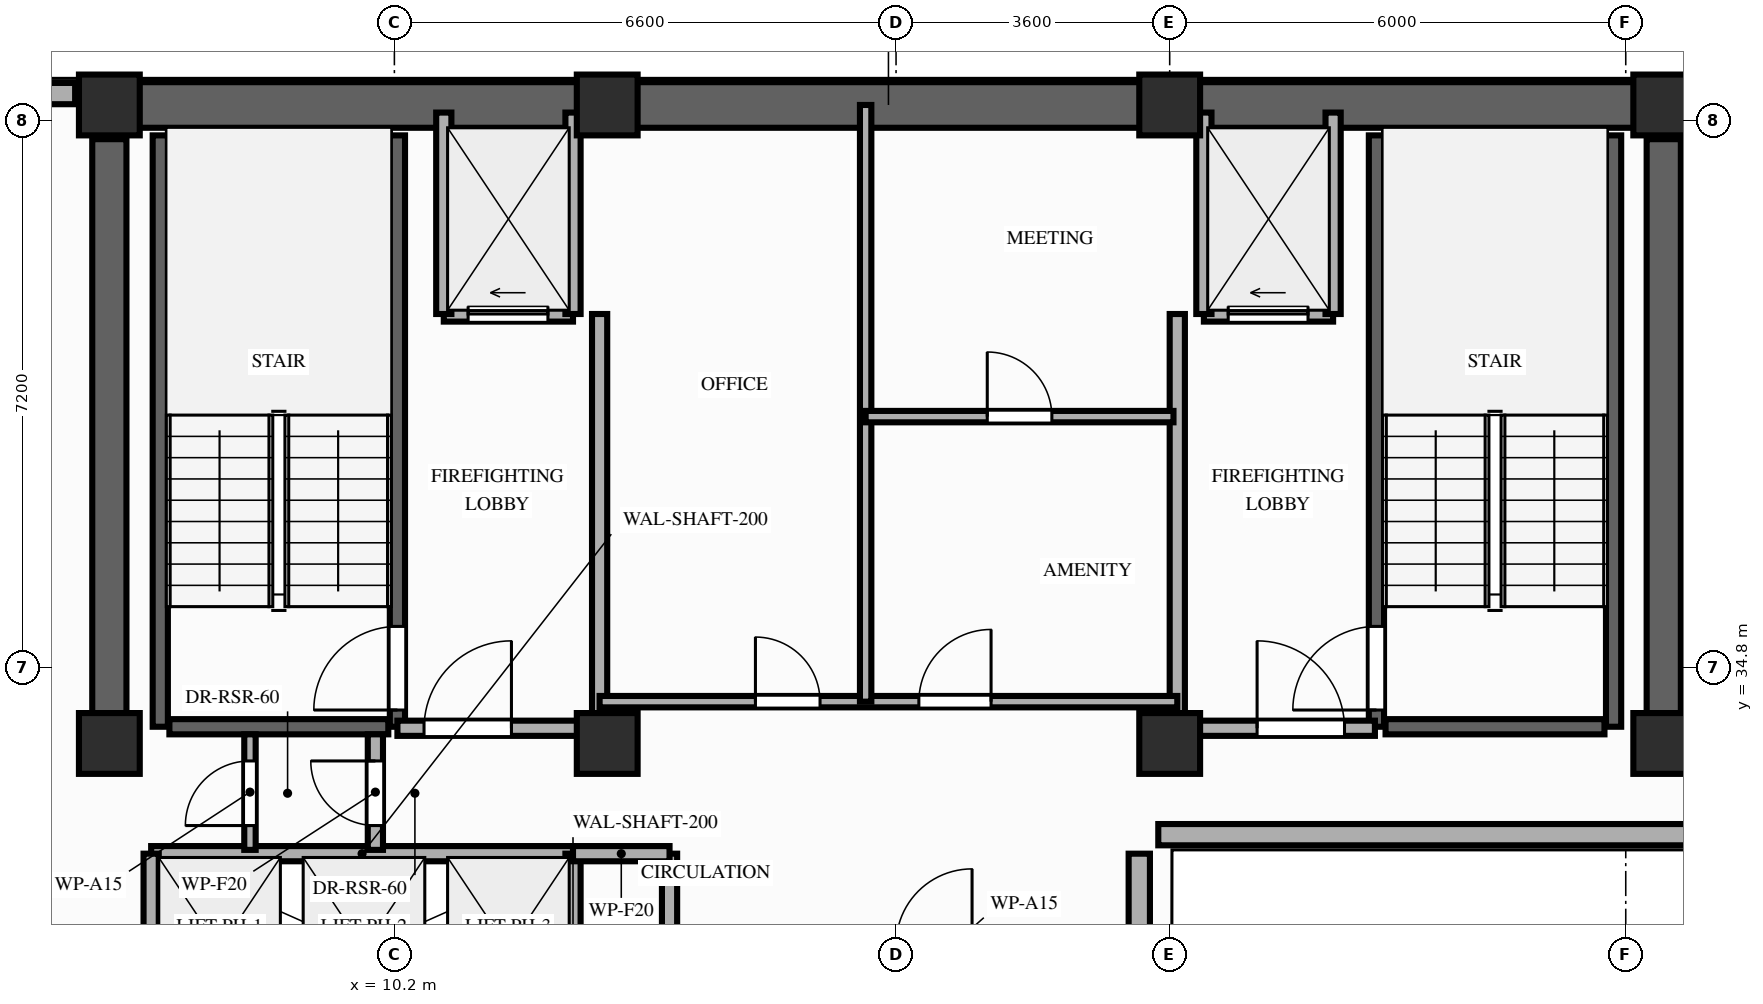
"""IFC4 building model, lengths in metres.
Left out: names, types, materials, properties, quantities, classifications, styles, units other than length and angle.
Written with IfcOpenShell. Run it as: python <this file> out.ifc"""

import sys

from ifc_helpers import new_model, si_unit, direction, frame, frame_2d, origin, origin_2d, place, context, subcontext, project, spatial, rectangle, extrude, element, fill, save


model = new_model("IFC4")
c1 = context("Model", 3, precision=1e-05, world=origin(), true_north=direction((0.0, 1.0)))
c2 = subcontext(c1, "Body", "Model", "MODEL_VIEW")
j1 = project(units=[si_unit("LENGTHUNIT", "METRE"), si_unit("PLANEANGLEUNIT", "RADIAN")], contexts=[c1])
p1 = place(None, origin())
s1 = spatial("IfcSite", under=j1, at=p1, CompositionType="ELEMENT")
p2 = place(p1, origin())
s2 = spatial("IfcBuilding", under=s1, at=p2, CompositionType="ELEMENT")
p3 = place(p2, frame((0.0, 0.0, 221.6)))
s3 = spatial("IfcBuildingStorey", under=s2, at=p3, CompositionType="ELEMENT", Elevation=221.6)
for number, where, z_axis, x_axis in (
    (1, (6.45, 33.8, 0.0), (0.0, 0.0, 1.0), (1.0, 0.0, 0.0)),
    (2, (13.0, 33.8, 0.0), (0.0, 0.0, 1.0), (1.0, 0.0, 0.0)),
    (3, (20.4, 33.8, 0.0), (0.0, 0.0, 1.0), (1.0, 0.0, 0.0)),
    (4, (26.9, 33.8, 0.0), (0.0, 0.0, 1.0), (1.0, 0.0, 0.0)),
    (5, (6.45, 42.2, 0.0), (0.0, 0.0, 1.0), (1.0, 0.0, 0.0)),
    (6, (13.0, 42.2, 0.0), (0.0, 0.0, 1.0), (1.0, 0.0, 0.0)),
    (7, (20.4, 42.2, 0.0), (0.0, 0.0, 1.0), (1.0, 0.0, 0.0)),
    (8, (26.9, 42.2, 0.0), (0.0, 0.0, 1.0), (1.0, 0.0, 0.0)),
):
    element("IfcColumn", number, at=place(p3, frame(where, z_axis=z_axis, x_axis=x_axis)), inside=s3, PredefinedType="COLUMN", context=c2, shape_type="SweptSolid", body=[
        extrude(rectangle(XDim=0.8, YDim=0.8, at=origin_2d()), origin(), (0.0, 0.0, 1.0), 3.2),
    ])
p4 = place(p3, frame((20.0, 8.8, 0.0), z_axis=(0.0, 0.0, 1.0), x_axis=(0.0, 1.0, 0.0)))
e9 = element("IfcWall", 9, at=p4, inside=s3, PredefinedType="STANDARD", context=c2, shape_type="SweptSolid", body=[
    extrude(rectangle(XDim=23.55, YDim=0.28, at=frame_2d((11.775, 0.0))), origin(), (0.0, 0.0, 1.0), 2.51),
])
p5 = place(p4, frame((1.84, 0.0, 0.85)))
e10 = element("IfcOpeningElement", 10, at=p5, cuts=e9, PredefinedType="OPENING", context=c2, shape_type="SweptSolid", body=[
    extrude(rectangle(XDim=1.1, YDim=1.41, at=frame_2d((0.55, 0.705))), frame((0.0, 0.15, 0.0), z_axis=(0.0, -1.0, 0.0), x_axis=(1.0, 0.0, 0.0)), (0.0, 0.0, 1.0), 0.3),
])
p6 = place(p4, frame((5.45, 0.0, 0.85)))
e11 = element("IfcOpeningElement", 11, at=p6, cuts=e9, PredefinedType="OPENING", context=c2, shape_type="SweptSolid", body=[
    extrude(rectangle(XDim=2.1, YDim=1.41, at=frame_2d((1.05, 0.705))), frame((0.0, 0.15, 0.0), z_axis=(0.0, -1.0, 0.0), x_axis=(1.0, 0.0, 0.0)), (0.0, 0.0, 1.0), 0.3),
])
p7 = place(p4, frame((10.85, 0.0, 0.85)))
e12 = element("IfcOpeningElement", 12, at=p7, cuts=e9, PredefinedType="OPENING", context=c2, shape_type="SweptSolid", body=[
    extrude(rectangle(XDim=2.1, YDim=1.41, at=frame_2d((1.05, 0.705))), frame((0.0, 0.15, 0.0), z_axis=(0.0, -1.0, 0.0), x_axis=(1.0, 0.0, 0.0)), (0.0, 0.0, 1.0), 0.3),
])
p8 = place(p3, frame((6.0, 42.35, 0.0), z_axis=(0.0, 0.0, 1.0), x_axis=(-1.0, 0.0, 0.0)))
e13 = element("IfcWall", 13, at=p8, inside=s3, PredefinedType="STANDARD", context=c2, shape_type="SweptSolid", body=[
    extrude(rectangle(XDim=2.0, YDim=0.28, at=frame_2d((1.0, 0.0))), origin(), (0.0, 0.0, 1.0), 3.02),
])
p9 = place(p3, frame((20.25, 32.6, 0.0), z_axis=(0.0, 0.0, 1.0), x_axis=(1.0, 0.0, 0.0)))
e14 = element("IfcWall", 14, at=p9, inside=s3, PredefinedType="STANDARD", context=c2, shape_type="SweptSolid", body=[
    extrude(rectangle(XDim=7.35, YDim=0.28, at=frame_2d((3.675, 0.0))), origin(), (0.0, 0.0, 1.0), 2.51),
])
p10 = place(p3, frame((6.45, 42.2, 0.0), z_axis=(0.0, 0.0, 1.0), x_axis=(1.0, 0.0, 0.0)))
e15 = element("IfcWall", 15, at=p10, inside=s3, PredefinedType="SHEAR", context=c2, shape_type="SweptSolid", body=[
    extrude(rectangle(XDim=20.45, YDim=0.6, at=frame_2d((10.225, 0.0))), origin(), (0.0, 0.0, 1.0), 3.02),
])
for number, where, z_axis, x_axis in (
    (16, (6.45, 33.8, 0.0), (0.0, 0.0, 1.0), (0.0, 1.0, 0.0)),
    (17, (26.9, 33.8, 0.0), (0.0, 0.0, 1.0), (0.0, 1.0, 0.0)),
):
    element("IfcWall", number, at=place(p3, frame(where, z_axis=z_axis, x_axis=x_axis)), inside=s3, PredefinedType="SHEAR", context=c2, shape_type="SweptSolid", body=[
        extrude(rectangle(XDim=7.95, YDim=0.45, at=frame_2d((3.975, 0.0))), origin(), (0.0, 0.0, 1.0), 3.02),
    ])
p11 = place(p3, frame((7.12, 34.02, 0.0), z_axis=(0.0, 0.0, 1.0), x_axis=(0.0, 1.0, 0.0)))
e18 = element("IfcWall", 18, at=p11, inside=s3, PredefinedType="SHEAR", context=c2, shape_type="SweptSolid", body=[
    extrude(rectangle(XDim=7.78, YDim=0.2, at=frame_2d((3.89, 0.0))), origin(), (0.0, 0.0, 1.0), 3.02),
])
p12 = place(p3, frame((10.24, 34.02, 0.0), z_axis=(0.0, 0.0, 1.0), x_axis=(0.0, 1.0, 0.0)))
e19 = element("IfcWall", 19, at=p12, inside=s3, PredefinedType="SHEAR", context=c2, shape_type="SweptSolid", body=[
    extrude(rectangle(XDim=7.78, YDim=0.2, at=frame_2d((3.89, 0.0))), origin(), (0.0, 0.0, 1.0), 3.02),
])
p13 = place(p12, frame((0.22, 0.0, 0.0)))
e20 = element("IfcOpeningElement", 20, at=p13, cuts=e19, PredefinedType="OPENING", context=c2, shape_type="SweptSolid", body=[
    extrude(rectangle(XDim=1.1, YDim=2.15, at=frame_2d((0.55, 1.075))), frame((0.0, 0.11, 0.0), z_axis=(0.0, -1.0, 0.0), x_axis=(1.0, 0.0, 0.0)), (0.0, 0.0, 1.0), 0.22),
])
p14 = place(p3, frame((7.24, 34.02, 0.0), z_axis=(0.0, 0.0, 1.0), x_axis=(1.0, 0.0, 0.0)))
e21 = element("IfcWall", 21, at=p14, inside=s3, PredefinedType="SHEAR", context=c2, shape_type="SweptSolid", body=[
    extrude(rectangle(XDim=2.88, YDim=0.2, at=frame_2d((1.44, 0.0))), origin(), (0.0, 0.0, 1.0), 3.02),
])
p15 = place(p3, frame((23.12, 34.02, 0.0), z_axis=(0.0, 0.0, 1.0), x_axis=(0.0, 1.0, 0.0)))
e22 = element("IfcWall", 22, at=p15, inside=s3, PredefinedType="SHEAR", context=c2, shape_type="SweptSolid", body=[
    extrude(rectangle(XDim=7.78, YDim=0.2, at=frame_2d((3.89, 0.0))), origin(), (0.0, 0.0, 1.0), 3.02),
])
p16 = place(p15, frame((0.22, 0.0, 0.0)))
e23 = element("IfcOpeningElement", 23, at=p16, cuts=e22, PredefinedType="OPENING", context=c2, shape_type="SweptSolid", body=[
    extrude(rectangle(XDim=1.1, YDim=2.15, at=frame_2d((0.55, 1.075))), frame((0.0, 0.11, 0.0), z_axis=(0.0, -1.0, 0.0), x_axis=(1.0, 0.0, 0.0)), (0.0, 0.0, 1.0), 0.22),
])
p17 = place(p3, frame((26.24, 34.02, 0.0), z_axis=(0.0, 0.0, 1.0), x_axis=(0.0, 1.0, 0.0)))
e24 = element("IfcWall", 24, at=p17, inside=s3, PredefinedType="SHEAR", context=c2, shape_type="SweptSolid", body=[
    extrude(rectangle(XDim=7.78, YDim=0.2, at=frame_2d((3.89, 0.0))), origin(), (0.0, 0.0, 1.0), 3.02),
])
p18 = place(p3, frame((23.24, 34.02, 0.0), z_axis=(0.0, 0.0, 1.0), x_axis=(1.0, 0.0, 0.0)))
e25 = element("IfcWall", 25, at=p18, inside=s3, PredefinedType="SHEAR", context=c2, shape_type="SweptSolid", body=[
    extrude(rectangle(XDim=2.88, YDim=0.2, at=frame_2d((1.44, 0.0))), origin(), (0.0, 0.0, 1.0), 3.02),
])
p19 = place(p3, frame((7.0, 32.35, 0.0), z_axis=(0.0, 0.0, 1.0), x_axis=(1.0, 0.0, 0.0)))
e26 = element("IfcWall", 26, at=p19, inside=s3, PredefinedType="MOVABLE", context=c2, shape_type="SweptSolid", body=[
    extrude(rectangle(XDim=5.55, YDim=0.2, at=frame_2d((2.775, 0.0))), origin(), (0.0, 0.0, 1.0), 3.02),
])
for number, where, z_axis, x_axis in (
    (27, (7.0, 29.85, 0.0), (0.0, 0.0, 1.0), (0.0, 1.0, 0.0)),
    (28, (12.55, 29.85, 0.0), (0.0, 0.0, 1.0), (0.0, 1.0, 0.0)),
):
    element("IfcWall", number, at=place(p3, frame(where, z_axis=z_axis, x_axis=x_axis)), inside=s3, PredefinedType="MOVABLE", context=c2, shape_type="SweptSolid", body=[
        extrude(rectangle(XDim=2.5, YDim=0.2, at=frame_2d((1.25, 0.0))), origin(), (0.0, 0.0, 1.0), 3.02),
    ])
p20 = place(p3, frame((10.85, 39.45, 0.0), z_axis=(0.0, 0.0, 1.0), x_axis=(1.0, 0.0, 0.0)))
e29 = element("IfcWall", 29, at=p20, inside=s3, PredefinedType="MOVABLE", context=c2, shape_type="SweptSolid", body=[
    extrude(rectangle(XDim=1.7, YDim=0.2, at=frame_2d((0.85, 0.0))), origin(), (0.0, 0.0, 1.0), 3.02),
])
p21 = place(p20, frame((0.32, 0.0, 0.0)))
e30 = element("IfcOpeningElement", 30, at=p21, cuts=e29, PredefinedType="OPENING", context=c2, shape_type="SweptSolid", body=[
    extrude(rectangle(XDim=1.05, YDim=2.15, at=frame_2d((0.525, 1.075))), frame((0.0, 0.11, 0.0), z_axis=(0.0, -1.0, 0.0), x_axis=(1.0, 0.0, 0.0)), (0.0, 0.0, 1.0), 0.22),
])
p22 = place(p3, frame((20.85, 39.45, 0.0), z_axis=(0.0, 0.0, 1.0), x_axis=(1.0, 0.0, 0.0)))
e31 = element("IfcWall", 31, at=p22, inside=s3, PredefinedType="MOVABLE", context=c2, shape_type="SweptSolid", body=[
    extrude(rectangle(XDim=1.7, YDim=0.2, at=frame_2d((0.85, 0.0))), origin(), (0.0, 0.0, 1.0), 3.02),
])
p23 = place(p22, frame((0.32, 0.0, 0.0)))
e32 = element("IfcOpeningElement", 32, at=p23, cuts=e31, PredefinedType="OPENING", context=c2, shape_type="SweptSolid", body=[
    extrude(rectangle(XDim=1.05, YDim=2.15, at=frame_2d((0.525, 1.075))), frame((0.0, 0.11, 0.0), z_axis=(0.0, -1.0, 0.0), x_axis=(1.0, 0.0, 0.0)), (0.0, 0.0, 1.0), 0.22),
])
for number, where, z_axis, x_axis in (
    (33, (10.85, 39.45, 0.0), (0.0, 0.0, 1.0), (0.0, 1.0, 0.0)),
    (34, (12.55, 39.45, 0.0), (0.0, 0.0, 1.0), (0.0, 1.0, 0.0)),
):
    element("IfcWall", number, at=place(p3, frame(where, z_axis=z_axis, x_axis=x_axis)), inside=s3, PredefinedType="MOVABLE", context=c2, shape_type="SweptSolid", body=[
        extrude(rectangle(XDim=2.65, YDim=0.2, at=frame_2d((1.325, 0.0))), origin(), (0.0, 0.0, 1.0), 2.51),
    ])
p24 = place(p3, frame((12.9, 34.0, 0.0), z_axis=(0.0, 0.0, 1.0), x_axis=(0.0, 1.0, 0.0)))
e35 = element("IfcWall", 35, at=p24, inside=s3, PredefinedType="PARTITIONING", context=c2, shape_type="SweptSolid", body=[
    extrude(rectangle(XDim=5.45, YDim=0.2, at=frame_2d((2.725, 0.0))), origin(), (0.0, 0.0, 1.0), 2.51),
])
p25 = place(p3, frame((10.24, 34.0, 0.0), z_axis=(0.0, 0.0, 1.0), x_axis=(1.0, 0.0, 0.0)))
e36 = element("IfcWall", 36, at=p25, inside=s3, PredefinedType="PARTITIONING", context=c2, shape_type="SweptSolid", body=[
    extrude(rectangle(XDim=2.66, YDim=0.2, at=frame_2d((1.33, 0.0))), origin(), (0.0, 0.0, 1.0), 2.51),
])
p26 = place(p25, frame((0.35, 0.0, 0.0)))
e37 = element("IfcOpeningElement", 37, at=p26, cuts=e36, PredefinedType="OPENING", context=c2, shape_type="SweptSolid", body=[
    extrude(rectangle(XDim=1.15, YDim=2.15, at=frame_2d((0.575, 1.075))), frame((0.0, 0.11, 0.0), z_axis=(0.0, -1.0, 0.0), x_axis=(1.0, 0.0, 0.0)), (0.0, 0.0, 1.0), 0.22),
])
for number, where, z_axis, x_axis in (
    (38, (20.85, 39.45, 0.0), (0.0, 0.0, 1.0), (0.0, 1.0, 0.0)),
    (39, (22.55, 39.45, 0.0), (0.0, 0.0, 1.0), (0.0, 1.0, 0.0)),
):
    element("IfcWall", number, at=place(p3, frame(where, z_axis=z_axis, x_axis=x_axis)), inside=s3, PredefinedType="MOVABLE", context=c2, shape_type="SweptSolid", body=[
        extrude(rectangle(XDim=2.65, YDim=0.2, at=frame_2d((1.325, 0.0))), origin(), (0.0, 0.0, 1.0), 2.51),
    ])
p27 = place(p3, frame((20.5, 34.0, 0.0), z_axis=(0.0, 0.0, 1.0), x_axis=(0.0, 1.0, 0.0)))
e40 = element("IfcWall", 40, at=p27, inside=s3, PredefinedType="PARTITIONING", context=c2, shape_type="SweptSolid", body=[
    extrude(rectangle(XDim=5.45, YDim=0.2, at=frame_2d((2.725, 0.0))), origin(), (0.0, 0.0, 1.0), 2.51),
])
p28 = place(p3, frame((20.5, 34.0, 0.0), z_axis=(0.0, 0.0, 1.0), x_axis=(1.0, 0.0, 0.0)))
e41 = element("IfcWall", 41, at=p28, inside=s3, PredefinedType="PARTITIONING", context=c2, shape_type="SweptSolid", body=[
    extrude(rectangle(XDim=2.6, YDim=0.2, at=frame_2d((1.3, 0.0))), origin(), (0.0, 0.0, 1.0), 2.51),
])
p29 = place(p28, frame((1.05, 0.0, 0.0)))
e42 = element("IfcOpeningElement", 42, at=p29, cuts=e41, PredefinedType="OPENING", context=c2, shape_type="SweptSolid", body=[
    extrude(rectangle(XDim=1.15, YDim=2.15, at=frame_2d((0.575, 1.075))), frame((0.0, 0.11, 0.0), z_axis=(0.0, -1.0, 0.0), x_axis=(1.0, 0.0, 0.0)), (0.0, 0.0, 1.0), 0.22),
])
p30 = place(p3, frame((9.95, 32.4, 0.0), z_axis=(0.0, 0.0, 1.0), x_axis=(0.0, 1.0, 0.0)))
e43 = element("IfcWall", 43, at=p30, inside=s3, PredefinedType="PARTITIONING", context=c2, shape_type="SweptSolid", body=[
    extrude(rectangle(XDim=1.52, YDim=0.2, at=frame_2d((0.76, 0.0))), origin(), (0.0, 0.0, 1.0), 2.51),
])
p31 = place(p30, frame((0.32, 0.0, 0.0)))
e44 = element("IfcOpeningElement", 44, at=p31, cuts=e43, PredefinedType="OPENING", context=c2, shape_type="SweptSolid", body=[
    extrude(rectangle(XDim=0.85, YDim=2.05, at=frame_2d((0.425, 1.025))), frame((0.0, 0.11, 0.0), z_axis=(0.0, -1.0, 0.0), x_axis=(1.0, 0.0, 0.0)), (0.0, 0.0, 1.0), 0.22),
])
p32 = place(p3, frame((8.3, 32.4, 0.0), z_axis=(0.0, 0.0, 1.0), x_axis=(0.0, 1.0, 0.0)))
e45 = element("IfcWall", 45, at=p32, inside=s3, PredefinedType="PARTITIONING", context=c2, shape_type="SweptSolid", body=[
    extrude(rectangle(XDim=1.52, YDim=0.15, at=frame_2d((0.76, 0.0))), origin(), (0.0, 0.0, 1.0), 2.51),
])
p33 = place(p32, frame((0.32, 0.0, 0.0)))
e46 = element("IfcOpeningElement", 46, at=p33, cuts=e45, PredefinedType="OPENING", context=c2, shape_type="SweptSolid", body=[
    extrude(rectangle(XDim=0.85, YDim=2.05, at=frame_2d((0.425, 1.025))), frame((0.0, 0.085, 0.0), z_axis=(0.0, -1.0, 0.0), x_axis=(1.0, 0.0, 0.0)), (0.0, 0.0, 1.0), 0.17),
])
p34 = place(p3, frame((13.82, 29.85, 0.0), z_axis=(0.0, 0.0, 1.0), x_axis=(0.0, 1.0, 0.0)))
e47 = element("IfcWall", 47, at=p34, inside=s3, PredefinedType="PARTITIONING", context=c2, shape_type="SweptSolid", body=[
    extrude(rectangle(XDim=2.5, YDim=0.2, at=frame_2d((1.25, 0.0))), origin(), (0.0, 0.0, 1.0), 3.02),
])
p35 = place(p3, frame((12.55, 32.35, 0.0), z_axis=(0.0, 0.0, 1.0), x_axis=(1.0, 0.0, 0.0)))
e48 = element("IfcWall", 48, at=p35, inside=s3, PredefinedType="PARTITIONING", context=c2, shape_type="SweptSolid", body=[
    extrude(rectangle(XDim=1.27, YDim=0.2, at=frame_2d((0.635, 0.0))), origin(), (0.0, 0.0, 1.0), 3.02),
])
p36 = place(p3, frame((12.9, 34.35, 0.0), z_axis=(0.0, 0.0, 1.0), x_axis=(1.0, 0.0, 0.0)))
e49 = element("IfcWall", 49, at=p36, inside=s3, PredefinedType="PARTITIONING", context=c2, shape_type="SweptSolid", body=[
    extrude(rectangle(XDim=7.6, YDim=0.15, at=frame_2d((3.8, 0.0))), origin(), (0.0, 0.0, 1.0), 3.02),
])
p37 = place(p36, frame((2.05, 0.0, 0.0)))
e50 = element("IfcOpeningElement", 50, at=p37, cuts=e49, PredefinedType="OPENING", context=c2, shape_type="SweptSolid", body=[
    extrude(rectangle(XDim=0.85, YDim=2.05, at=frame_2d((0.425, 1.025))), frame((0.0, 0.085, 0.0), z_axis=(0.0, -1.0, 0.0), x_axis=(1.0, 0.0, 0.0)), (0.0, 0.0, 1.0), 0.17),
])
p38 = place(p36, frame((4.2, 0.0, 0.0)))
e51 = element("IfcOpeningElement", 51, at=p38, cuts=e49, PredefinedType="OPENING", context=c2, shape_type="SweptSolid", body=[
    extrude(rectangle(XDim=0.95, YDim=2.15, at=frame_2d((0.475, 1.075))), frame((0.0, 0.085, 0.0), z_axis=(0.0, -1.0, 0.0), x_axis=(1.0, 0.0, 0.0)), (0.0, 0.0, 1.0), 0.17),
])
p39 = place(p3, frame((16.4, 34.35, 0.0), z_axis=(0.0, 0.0, 1.0), x_axis=(0.0, 1.0, 0.0)))
e52 = element("IfcWall", 52, at=p39, inside=s3, PredefinedType="PARTITIONING", context=c2, shape_type="SweptSolid", body=[
    extrude(rectangle(XDim=7.85, YDim=0.15, at=frame_2d((3.925, 0.0))), origin(), (0.0, 0.0, 1.0), 2.51),
])
p40 = place(p3, frame((16.4, 38.1, 0.0), z_axis=(0.0, 0.0, 1.0), x_axis=(1.0, 0.0, 0.0)))
e53 = element("IfcWall", 53, at=p40, inside=s3, PredefinedType="PARTITIONING", context=c2, shape_type="SweptSolid", body=[
    extrude(rectangle(XDim=4.05, YDim=0.15, at=frame_2d((2.025, 0.0))), origin(), (0.0, 0.0, 1.0), 3.02),
])
p41 = place(p40, frame((1.6, 0.0, 0.0)))
e54 = element("IfcOpeningElement", 54, at=p41, cuts=e53, PredefinedType="OPENING", context=c2, shape_type="SweptSolid", body=[
    extrude(rectangle(XDim=0.85, YDim=2.05, at=frame_2d((0.425, 1.025))), frame((0.0, 0.085, 0.0), z_axis=(0.0, -1.0, 0.0), x_axis=(1.0, 0.0, 0.0)), (0.0, 0.0, 1.0), 0.17),
])
p42 = place(p13, origin())
e55 = element("IfcDoor", 55, at=p42, inside=s3, OperationType="SINGLE_SWING_LEFT", PredefinedType="DOOR", context=c2, shape_type="SweptSolid", body=[
    extrude(rectangle(XDim=1.1, YDim=2.15, at=frame_2d((0.55, 1.075))), frame((0.0, 0.025, 0.0), z_axis=(0.0, -1.0, 0.0), x_axis=(1.0, 0.0, 0.0)), (0.0, 0.0, 1.0), 0.05),
])
fill(e20, e55)
p43 = place(p16, origin())
e56 = element("IfcDoor", 56, at=p43, inside=s3, OperationType="SINGLE_SWING_LEFT", PredefinedType="DOOR", context=c2, shape_type="SweptSolid", body=[
    extrude(rectangle(XDim=1.1, YDim=2.15, at=frame_2d((0.55, 1.075))), frame((0.0, 0.025, 0.0), z_axis=(0.0, -1.0, 0.0), x_axis=(1.0, 0.0, 0.0)), (0.0, 0.0, 1.0), 0.05),
])
fill(e23, e56)
p44 = place(p21, origin())
e57 = element("IfcDoor", 57, at=p44, inside=s3, OperationType="SLIDING_TO_LEFT", PredefinedType="DOOR", context=c2, shape_type="SweptSolid", body=[
    extrude(rectangle(XDim=1.05, YDim=2.15, at=frame_2d((0.525, 1.075))), frame((0.0, 0.025, 0.0), z_axis=(0.0, -1.0, 0.0), x_axis=(1.0, 0.0, 0.0)), (0.0, 0.0, 1.0), 0.05),
])
fill(e30, e57)
p45 = place(p23, origin())
e58 = element("IfcDoor", 58, at=p45, inside=s3, OperationType="SLIDING_TO_LEFT", PredefinedType="DOOR", context=c2, shape_type="SweptSolid", body=[
    extrude(rectangle(XDim=1.05, YDim=2.15, at=frame_2d((0.525, 1.075))), frame((0.0, 0.025, 0.0), z_axis=(0.0, -1.0, 0.0), x_axis=(1.0, 0.0, 0.0)), (0.0, 0.0, 1.0), 0.05),
])
fill(e32, e58)
p46 = place(p26, origin())
e59 = element("IfcDoor", 59, at=p46, inside=s3, OperationType="SINGLE_SWING_RIGHT", PredefinedType="DOOR", context=c2, shape_type="SweptSolid", body=[
    extrude(rectangle(XDim=1.15, YDim=2.15, at=frame_2d((0.575, 1.075))), frame((0.0, 0.025, 0.0), z_axis=(0.0, -1.0, 0.0), x_axis=(1.0, 0.0, 0.0)), (0.0, 0.0, 1.0), 0.05),
])
fill(e37, e59)
p47 = place(p29, origin())
e60 = element("IfcDoor", 60, at=p47, inside=s3, OperationType="SINGLE_SWING_LEFT", PredefinedType="DOOR", context=c2, shape_type="SweptSolid", body=[
    extrude(rectangle(XDim=1.15, YDim=2.15, at=frame_2d((0.575, 1.075))), frame((0.0, 0.025, 0.0), z_axis=(0.0, -1.0, 0.0), x_axis=(1.0, 0.0, 0.0)), (0.0, 0.0, 1.0), 0.05),
])
fill(e42, e60)
p48 = place(p31, origin())
e61 = element("IfcDoor", 61, at=p48, inside=s3, OperationType="SINGLE_SWING_RIGHT", PredefinedType="DOOR", context=c2, shape_type="SweptSolid", body=[
    extrude(rectangle(XDim=0.85, YDim=2.05, at=frame_2d((0.425, 1.025))), frame((0.0, 0.025, 0.0), z_axis=(0.0, -1.0, 0.0), x_axis=(1.0, 0.0, 0.0)), (0.0, 0.0, 1.0), 0.05),
])
fill(e44, e61)
p49 = place(p33, origin())
e62 = element("IfcDoor", 62, at=p49, inside=s3, OperationType="SINGLE_SWING_LEFT", PredefinedType="DOOR", context=c2, shape_type="SweptSolid", body=[
    extrude(rectangle(XDim=0.85, YDim=2.05, at=frame_2d((0.425, 1.025))), frame((0.0, 0.025, 0.0), z_axis=(0.0, -1.0, 0.0), x_axis=(1.0, 0.0, 0.0)), (0.0, 0.0, 1.0), 0.05),
])
fill(e46, e62)
p50 = place(p37, origin())
e63 = element("IfcDoor", 63, at=p50, inside=s3, OperationType="SINGLE_SWING_LEFT", PredefinedType="DOOR", context=c2, shape_type="SweptSolid", body=[
    extrude(rectangle(XDim=0.85, YDim=2.05, at=frame_2d((0.425, 1.025))), frame((0.0, 0.025, 0.0), z_axis=(0.0, -1.0, 0.0), x_axis=(1.0, 0.0, 0.0)), (0.0, 0.0, 1.0), 0.05),
])
fill(e50, e63)
p51 = place(p38, origin())
e64 = element("IfcDoor", 64, at=p51, inside=s3, OperationType="SINGLE_SWING_RIGHT", PredefinedType="DOOR", context=c2, shape_type="SweptSolid", body=[
    extrude(rectangle(XDim=0.95, YDim=2.15, at=frame_2d((0.475, 1.075))), frame((0.0, 0.025, 0.0), z_axis=(0.0, -1.0, 0.0), x_axis=(1.0, 0.0, 0.0)), (0.0, 0.0, 1.0), 0.05),
])
fill(e51, e64)
p52 = place(p41, origin())
e65 = element("IfcDoor", 65, at=p52, inside=s3, OperationType="SINGLE_SWING_LEFT", PredefinedType="DOOR", context=c2, shape_type="SweptSolid", body=[
    extrude(rectangle(XDim=0.85, YDim=2.05, at=frame_2d((0.425, 1.025))), frame((0.0, 0.025, 0.0), z_axis=(0.0, -1.0, 0.0), x_axis=(1.0, 0.0, 0.0)), (0.0, 0.0, 1.0), 0.05),
])
fill(e54, e65)
save(model, sys.argv[1])
